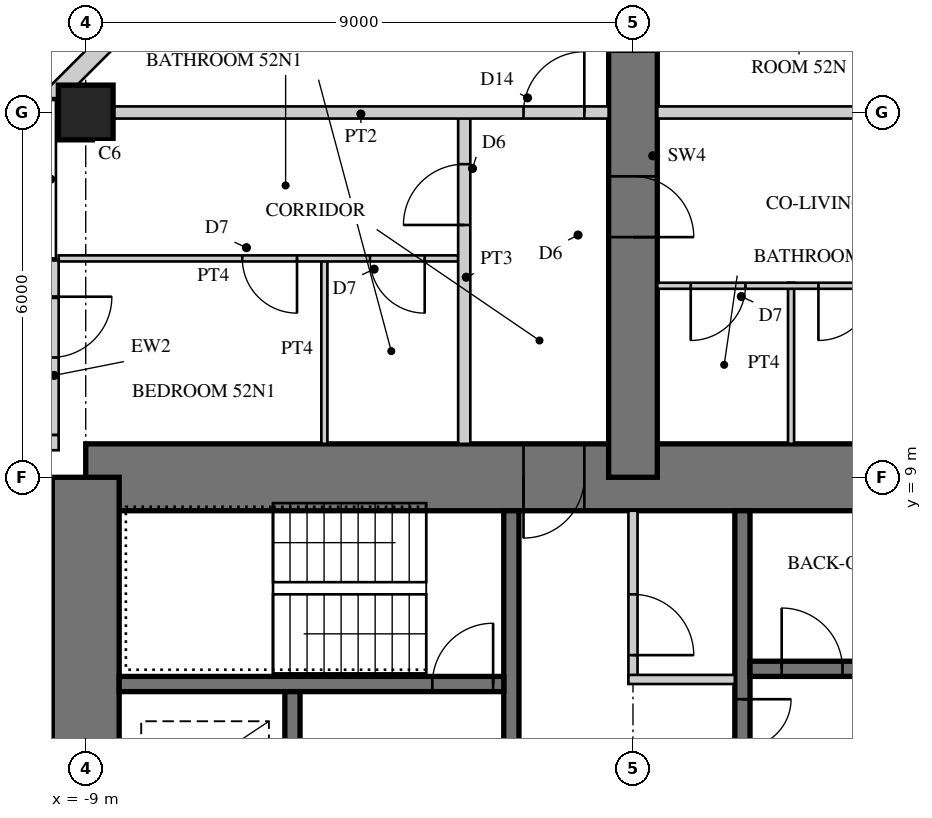
"""IFC4 building model, lengths in metres.
Left out: names, types, materials, properties, quantities, classifications, styles, units other than length and angle.
Written with IfcOpenShell. Run it as: python <this file> out.ifc"""

import sys

from ifc_helpers import new_model, si_unit, direction, frame, frame_2d, origin, origin_2d, place, context, subcontext, project, spatial, rectangle, hollow_rectangle, extrude, element, fill, save


model = new_model("IFC4")
c1 = context("Model", 3, precision=1e-05, world=origin(), true_north=direction((0.0, 1.0)))
c2 = subcontext(c1, "Body", "Model", "MODEL_VIEW")
j1 = project(units=[si_unit("LENGTHUNIT", "METRE"), si_unit("PLANEANGLEUNIT", "RADIAN")], contexts=[c1])
p1 = place(None, origin())
s1 = spatial("IfcSite", under=j1, at=p1, CompositionType="ELEMENT")
p2 = place(p1, origin())
s2 = spatial("IfcBuilding", under=s1, at=p2, CompositionType="ELEMENT")
p3 = place(p2, frame((0.0, 0.0, 206.9)))
s3 = spatial("IfcBuildingStorey", under=s2, at=p3, CompositionType="ELEMENT", Elevation=206.9)
p4 = place(p3, frame((9.0, 9.0, 0.0), z_axis=(0.0, 0.0, 1.0), x_axis=(-1.0, 0.0, 0.0)))
e1 = element("IfcWall", 1, at=p4, inside=s3, PredefinedType="SHEAR", context=c2, shape_type="SweptSolid", body=[
    extrude(rectangle(XDim=18.0, YDim=1.1, at=frame_2d((9.0, 0.0))), origin(), (0.0, 0.0, 1.0), 3.4),
])
p5 = place(p4, frame((9.8, 0.0, 0.0)))
e2 = element("IfcOpeningElement", 2, at=p5, cuts=e1, PredefinedType="OPENING", context=c2, shape_type="SweptSolid", body=[
    extrude(rectangle(XDim=1.0, YDim=2.4, at=frame_2d((0.5, 1.2))), frame((0.0, 0.56, 0.0), z_axis=(0.0, -1.0, 0.0), x_axis=(1.0, 0.0, 0.0)), (0.0, 0.0, 1.0), 1.12),
])
p6 = place(p3, frame((-9.0, 9.0, 0.0), z_axis=(0.0, 0.0, 1.0), x_axis=(0.0, -1.0, 0.0)))
e3 = element("IfcWall", 3, at=p6, inside=s3, PredefinedType="SHEAR", context=c2, shape_type="SweptSolid", body=[
    extrude(rectangle(XDim=18.0, YDim=1.1, at=frame_2d((9.0, 0.0))), origin(), (0.0, 0.0, 1.0), 3.4),
])
p7 = place(p6, frame((9.8, 0.0, 0.0)))
e4 = element("IfcOpeningElement", 4, at=p7, cuts=e3, PredefinedType="OPENING", context=c2, shape_type="SweptSolid", body=[
    extrude(rectangle(XDim=1.0, YDim=2.4, at=frame_2d((0.5, 1.2))), frame((0.0, 0.56, 0.0), z_axis=(0.0, -1.0, 0.0), x_axis=(1.0, 0.0, 0.0)), (0.0, 0.0, 1.0), 1.12),
])
p8 = place(p3, frame((1.8, 1.875, 0.0), z_axis=(0.0, 0.0, 1.0), x_axis=(0.0, 1.0, 0.0)))
e5 = element("IfcWall", 5, at=p8, inside=s3, PredefinedType="SHEAR", context=c2, shape_type="SweptSolid", body=[
    extrude(rectangle(XDim=6.575, YDim=0.25, at=frame_2d((3.288, 0.0))), origin(), (0.0, 0.0, 1.0), 3.4),
])
p9 = place(p8, frame((1.875, 0.0, 0.0)))
e6 = element("IfcOpeningElement", 6, at=p9, cuts=e5, PredefinedType="OPENING", context=c2, shape_type="SweptSolid", body=[
    extrude(rectangle(XDim=1.6, YDim=2.4, at=frame_2d((0.8, 1.2))), frame((0.0, 0.135, 0.0), z_axis=(0.0, -1.0, 0.0), x_axis=(1.0, 0.0, 0.0)), (0.0, 0.0, 1.0), 0.27),
])
p10 = place(p3, frame((1.925, 5.85, 0.0), z_axis=(0.0, 0.0, 1.0), x_axis=(1.0, 0.0, 0.0)))
e7 = element("IfcWall", 7, at=p10, inside=s3, PredefinedType="SHEAR", context=c2, shape_type="SweptSolid", body=[
    extrude(rectangle(XDim=6.525, YDim=0.25, at=frame_2d((3.262, 0.0))), origin(), (0.0, 0.0, 1.0), 3.4),
])
p11 = place(p10, frame((0.521, 0.0, 0.0)))
e8 = element("IfcOpeningElement", 8, at=p11, cuts=e7, PredefinedType="OPENING", context=c2, shape_type="SweptSolid", body=[
    extrude(rectangle(XDim=1.0, YDim=2.1, at=frame_2d((0.5, 1.05))), frame((0.0, 0.135, 0.0), z_axis=(0.0, -1.0, 0.0), x_axis=(1.0, 0.0, 0.0)), (0.0, 0.0, 1.0), 0.27),
])
p12 = place(p3, frame((-2.0, 1.675, 0.0), z_axis=(0.0, 0.0, 1.0), x_axis=(0.0, 1.0, 0.0)))
e9 = element("IfcWall", 9, at=p12, inside=s3, PredefinedType="SHEAR", context=c2, shape_type="SweptSolid", body=[
    extrude(rectangle(XDim=6.775, YDim=0.25, at=frame_2d((3.387, 0.0))), origin(), (0.0, 0.0, 1.0), 3.4),
])
p13 = place(p12, frame((0.725, 0.0, 0.0)))
e10 = element("IfcOpeningElement", 10, at=p13, cuts=e9, PredefinedType="OPENING", context=c2, shape_type="SweptSolid", body=[
    extrude(rectangle(XDim=1.0, YDim=2.1, at=frame_2d((0.5, 1.05))), frame((0.0, 0.135, 0.0), z_axis=(0.0, -1.0, 0.0), x_axis=(1.0, 0.0, 0.0)), (0.0, 0.0, 1.0), 0.27),
])
p14 = place(p3, frame((-2.125, 5.6, 0.0), z_axis=(0.0, 0.0, 1.0), x_axis=(-1.0, 0.0, 0.0)))
e11 = element("IfcWall", 11, at=p14, inside=s3, PredefinedType="SHEAR", context=c2, shape_type="SweptSolid", body=[
    extrude(rectangle(XDim=6.325, YDim=0.25, at=frame_2d((3.163, 0.0))), origin(), (0.0, 0.0, 1.0), 3.4),
])
p15 = place(p14, frame((0.175, 0.0, 0.0)))
e12 = element("IfcOpeningElement", 12, at=p15, cuts=e11, PredefinedType="OPENING", context=c2, shape_type="SweptSolid", body=[
    extrude(rectangle(XDim=1.0, YDim=2.1, at=frame_2d((0.5, 1.05))), frame((0.0, 0.135, 0.0), z_axis=(0.0, -1.0, 0.0), x_axis=(1.0, 0.0, 0.0)), (0.0, 0.0, 1.0), 0.27),
])
p16 = place(p3, frame((-5.6, 1.925, 0.0), z_axis=(0.0, 0.0, 1.0), x_axis=(0.0, 1.0, 0.0)))
e13 = element("IfcWall", 13, at=p16, inside=s3, PredefinedType="SHEAR", context=c2, shape_type="SweptSolid", body=[
    extrude(rectangle(XDim=3.55, YDim=0.25, at=frame_2d((1.775, 0.0))), origin(), (0.0, 0.0, 1.0), 3.4),
])
p17 = place(p16, frame((1.525, 0.0, 0.0)))
e14 = element("IfcOpeningElement", 14, at=p17, cuts=e13, PredefinedType="OPENING", context=c2, shape_type="SweptSolid", body=[
    extrude(rectangle(XDim=1.1, YDim=2.2, at=frame_2d((0.55, 1.1))), frame((0.0, 0.135, 0.0), z_axis=(0.0, -1.0, 0.0), x_axis=(1.0, 0.0, 0.0)), (0.0, 0.0, 1.0), 0.27),
])
p18 = place(p16, frame((0.075, 0.0, 0.0)))
e15 = element("IfcOpeningElement", 15, at=p18, cuts=e13, PredefinedType="OPENING", context=c2, shape_type="SweptSolid", body=[
    extrude(rectangle(XDim=0.8, YDim=2.1, at=frame_2d((0.4, 1.05))), frame((0.0, 0.135, 0.0), z_axis=(0.0, -1.0, 0.0), x_axis=(1.0, 0.0, 0.0)), (0.0, 0.0, 1.0), 0.27),
])
p19 = place(p3, frame((0.0, 9.0, 0.0), z_axis=(0.0, 0.0, 1.0), x_axis=(0.0, 1.0, 0.0)))
e16 = element("IfcWall", 16, at=p19, inside=s3, PredefinedType="SHEAR", context=c2, shape_type="SweptSolid", body=[
    extrude(rectangle(XDim=9.0, YDim=0.8, at=frame_2d((4.5, 0.0))), origin(), (0.0, 0.0, 1.0), 3.4),
])
p20 = place(p19, frame((3.95, 0.0, 0.0)))
e17 = element("IfcOpeningElement", 17, at=p20, cuts=e16, PredefinedType="OPENING", context=c2, shape_type="SweptSolid", body=[
    extrude(rectangle(XDim=1.0, YDim=2.15, at=frame_2d((0.5, 1.075))), frame((0.0, 0.41, 0.0), z_axis=(0.0, -1.0, 0.0), x_axis=(1.0, 0.0, 0.0)), (0.0, 0.0, 1.0), 0.82),
])
p21 = place(p19, frame((7.0, 0.0, 0.0)))
e18 = element("IfcOpeningElement", 18, at=p21, cuts=e16, PredefinedType="OPENING", context=c2, shape_type="SweptSolid", body=[
    extrude(rectangle(XDim=1.0, YDim=2.2, at=frame_2d((0.5, 1.1))), frame((0.0, 0.41, 0.0), z_axis=(0.0, -1.0, 0.0), x_axis=(1.0, 0.0, 0.0)), (0.0, 0.0, 1.0), 0.82),
])
p22 = place(p3, frame((-9.0, 15.0, 0.0), z_axis=(0.0, 0.0, 1.0), x_axis=(1.0, 0.0, 0.0)))
e19 = element("IfcColumn", 19, at=p22, inside=s3, PredefinedType="COLUMN", context=c2, shape_type="SweptSolid", body=[
    extrude(rectangle(XDim=0.9, YDim=0.9, at=origin_2d()), origin(), (0.0, 0.0, 1.0), 3.4),
])
p23 = place(p3, frame((-6.406, 18.4, 0.0), z_axis=(0.0, 0.0, 1.0), x_axis=(-0.707134062067, -0.707079499254, 0.0)))
e20 = element("IfcWall", 20, at=p23, inside=s3, PredefinedType="SOLIDWALL", context=c2, shape_type="SweptSolid", body=[
    extrude(rectangle(XDim=4.475, YDim=0.3, at=frame_2d((2.237, 0.0))), origin(), (0.0, 0.0, 1.0), 3.22),
])
p24 = place(p23, frame((1.787, 0.0, 0.3)))
e21 = element("IfcOpeningElement", 21, at=p24, cuts=e20, PredefinedType="OPENING", context=c2, shape_type="SweptSolid", body=[
    extrude(rectangle(XDim=0.9, YDim=2.4, at=frame_2d((0.45, 1.2))), frame((0.0, 0.16, 0.0), z_axis=(0.0, -1.0, 0.0), x_axis=(1.0, 0.0, 0.0)), (0.0, 0.0, 1.0), 0.32),
])
p25 = place(p3, frame((-9.57, 12.57, 0.0), z_axis=(0.0, 0.0, 1.0), x_axis=(0.0, -1.0, 0.0)))
e22 = element("IfcWall", 22, at=p25, inside=s3, PredefinedType="SOLIDWALL", context=c2, shape_type="SweptSolid", body=[
    extrude(rectangle(XDim=2.875, YDim=0.25, at=frame_2d((1.438, 0.0))), origin(), (0.0, 0.0, 1.0), 3.22),
])
p26 = place(p25, frame((0.6, 0.0, 0.0)))
e23 = element("IfcOpeningElement", 23, at=p26, cuts=e22, PredefinedType="OPENING", context=c2, shape_type="SweptSolid", body=[
    extrude(rectangle(XDim=1.0, YDim=2.2, at=frame_2d((0.5, 1.1))), frame((0.0, 0.135, 0.0), z_axis=(0.0, -1.0, 0.0), x_axis=(1.0, 0.0, 0.0)), (0.0, 0.0, 1.0), 0.27),
])
p27 = place(p3, frame((-9.445, 9.57, 0.0), z_axis=(0.0, 0.0, 1.0), x_axis=(-1.0, 0.0, 0.0)))
e24 = element("IfcWall", 24, at=p27, inside=s3, PredefinedType="SOLIDWALL", context=c2, shape_type="SweptSolid", body=[
    extrude(rectangle(XDim=3.125, YDim=0.25, at=frame_2d((1.562, 0.0))), origin(), (0.0, 0.0, 1.0), 3.22),
])
p28 = place(p27, frame((0.6, 0.0, 0.0)))
e25 = element("IfcOpeningElement", 25, at=p28, cuts=e24, PredefinedType="OPENING", context=c2, shape_type="SweptSolid", body=[
    extrude(rectangle(XDim=1.0, YDim=2.2, at=frame_2d((0.5, 1.1))), frame((0.0, 0.135, 0.0), z_axis=(0.0, -1.0, 0.0), x_axis=(1.0, 0.0, 0.0)), (0.0, 0.0, 1.0), 0.27),
])
p29 = place(p3, frame((0.0, 5.675, 0.0), z_axis=(0.0, 0.0, 1.0), x_axis=(0.0, 1.0, 0.0)))
e26 = element("IfcWall", 26, at=p29, inside=s3, PredefinedType="PARTITIONING", context=c2, shape_type="SweptSolid", body=[
    extrude(rectangle(XDim=2.775, YDim=0.15, at=frame_2d((1.387, 0.0))), origin(), (0.0, 0.0, 1.0), 3.22),
])
p30 = place(p29, frame((0.4, 0.0, 0.0)))
e27 = element("IfcOpeningElement", 27, at=p30, cuts=e26, PredefinedType="OPENING", context=c2, shape_type="SweptSolid", body=[
    extrude(rectangle(XDim=1.0, YDim=2.1, at=frame_2d((0.5, 1.05))), frame((0.0, 0.085, 0.0), z_axis=(0.0, -1.0, 0.0), x_axis=(1.0, 0.0, 0.0)), (0.0, 0.0, 1.0), 0.17),
])
p31 = place(p3, frame((1.675, 5.675, 0.0), z_axis=(0.0, 0.0, 1.0), x_axis=(-1.0, 0.0, 0.0)))
e28 = element("IfcWall", 28, at=p31, inside=s3, PredefinedType="PARTITIONING", context=c2, shape_type="SweptSolid", body=[
    extrude(rectangle(XDim=1.75, YDim=0.15, at=frame_2d((0.875, 0.0))), origin(), (0.0, 0.0, 1.0), 3.22),
])
p32 = place(p3, frame((-5.075, 9.55, 0.0), z_axis=(0.0, 0.0, 1.0), x_axis=(0.0, 1.0, 0.0)))
e29 = element("IfcWall", 29, at=p32, inside=s3, PredefinedType="PARTITIONING", context=c2, shape_type="SweptSolid", body=[
    extrude(rectangle(XDim=3.1, YDim=0.1, at=frame_2d((1.55, 0.0))), origin(), (0.0, 0.0, 1.0), 3.22),
])
p33 = place(p3, frame((-2.875, 12.6, 0.0), z_axis=(0.0, 0.0, 1.0), x_axis=(-1.0, 0.0, 0.0)))
e30 = element("IfcWall", 30, at=p33, inside=s3, PredefinedType="PARTITIONING", context=c2, shape_type="SweptSolid", body=[
    extrude(rectangle(XDim=6.57, YDim=0.1, at=frame_2d((3.285, 0.0))), origin(), (0.0, 0.0, 1.0), 3.22),
])
p34 = place(p33, frame((0.55, 0.0, 0.0)))
e31 = element("IfcOpeningElement", 31, at=p34, cuts=e30, PredefinedType="OPENING", context=c2, shape_type="SweptSolid", body=[
    extrude(rectangle(XDim=0.9, YDim=2.1, at=frame_2d((0.45, 1.05))), frame((0.0, 0.06, 0.0), z_axis=(0.0, -1.0, 0.0), x_axis=(1.0, 0.0, 0.0)), (0.0, 0.0, 1.0), 0.12),
])
p35 = place(p33, frame((2.65, 0.0, 0.0)))
e32 = element("IfcOpeningElement", 32, at=p35, cuts=e30, PredefinedType="OPENING", context=c2, shape_type="SweptSolid", body=[
    extrude(rectangle(XDim=0.9, YDim=2.1, at=frame_2d((0.45, 1.05))), frame((0.0, 0.06, 0.0), z_axis=(0.0, -1.0, 0.0), x_axis=(1.0, 0.0, 0.0)), (0.0, 0.0, 1.0), 0.12),
])
p36 = place(p3, frame((2.6, 9.55, 0.0), z_axis=(0.0, 0.0, 1.0), x_axis=(0.0, 1.0, 0.0)))
e33 = element("IfcWall", 33, at=p36, inside=s3, PredefinedType="PARTITIONING", context=c2, shape_type="SweptSolid", body=[
    extrude(rectangle(XDim=2.65, YDim=0.1, at=frame_2d((1.325, 0.0))), origin(), (0.0, 0.0, 1.0), 3.22),
])
p37 = place(p3, frame((9.445, 12.15, 0.0), z_axis=(0.0, 0.0, 1.0), x_axis=(-1.0, 0.0, 0.0)))
e34 = element("IfcWall", 34, at=p37, inside=s3, PredefinedType="PARTITIONING", context=c2, shape_type="SweptSolid", body=[
    extrude(rectangle(XDim=9.045, YDim=0.1, at=frame_2d((4.522, 0.0))), origin(), (0.0, 0.0, 1.0), 3.22),
])
p38 = place(p37, frame((5.495, 0.0, 0.0)))
e35 = element("IfcOpeningElement", 35, at=p38, cuts=e34, PredefinedType="OPENING", context=c2, shape_type="SweptSolid", body=[
    extrude(rectangle(XDim=0.9, YDim=2.1, at=frame_2d((0.45, 1.05))), frame((0.0, 0.06, 0.0), z_axis=(0.0, -1.0, 0.0), x_axis=(1.0, 0.0, 0.0)), (0.0, 0.0, 1.0), 0.12),
])
p39 = place(p37, frame((7.595, 0.0, 0.0)))
e36 = element("IfcOpeningElement", 36, at=p39, cuts=e34, PredefinedType="OPENING", context=c2, shape_type="SweptSolid", body=[
    extrude(rectangle(XDim=0.9, YDim=2.1, at=frame_2d((0.45, 1.05))), frame((0.0, 0.06, 0.0), z_axis=(0.0, -1.0, 0.0), x_axis=(1.0, 0.0, 0.0)), (0.0, 0.0, 1.0), 0.12),
])
p40 = place(p3, frame((-2.775, 9.55, 0.0), z_axis=(0.0, 0.0, 1.0), x_axis=(0.0, 1.0, 0.0)))
e37 = element("IfcWall", 37, at=p40, inside=s3, PredefinedType="SOLIDWALL", context=c2, shape_type="SweptSolid", body=[
    extrude(rectangle(XDim=5.45, YDim=0.2, at=frame_2d((2.725, 0.0))), origin(), (0.0, 0.0, 1.0), 3.22),
])
p41 = place(p40, frame((3.6, 0.0, 0.0)))
e38 = element("IfcOpeningElement", 38, at=p41, cuts=e37, PredefinedType="OPENING", context=c2, shape_type="SweptSolid", body=[
    extrude(rectangle(XDim=1.0, YDim=2.15, at=frame_2d((0.5, 1.075))), frame((0.0, 0.11, 0.0), z_axis=(0.0, -1.0, 0.0), x_axis=(1.0, 0.0, 0.0)), (0.0, 0.0, 1.0), 0.22),
])
p42 = place(p3, frame((8.55, 15.0, 0.0), z_axis=(0.0, 0.0, 1.0), x_axis=(-1.0, 0.0, 0.0)))
e39 = element("IfcWall", 39, at=p42, inside=s3, PredefinedType="SOLIDWALL", context=c2, shape_type="SweptSolid", body=[
    extrude(rectangle(XDim=8.15, YDim=0.2, at=frame_2d((4.075, 0.0))), origin(), (0.0, 0.0, 1.0), 2.47),
])
p43 = place(p3, frame((-0.4, 15.0, 0.0), z_axis=(0.0, 0.0, 1.0), x_axis=(-1.0, 0.0, 0.0)))
e40 = element("IfcWall", 40, at=p43, inside=s3, PredefinedType="SOLIDWALL", context=c2, shape_type="SweptSolid", body=[
    extrude(rectangle(XDim=8.15, YDim=0.2, at=frame_2d((4.075, 0.0))), origin(), (0.0, 0.0, 1.0), 2.47),
])
p44 = place(p43, frame((0.4, 0.0, 0.0)))
e41 = element("IfcOpeningElement", 41, at=p44, cuts=e40, PredefinedType="OPENING", context=c2, shape_type="SweptSolid", body=[
    extrude(rectangle(XDim=1.0, YDim=2.2, at=frame_2d((0.5, 1.1))), frame((0.0, 0.11, 0.0), z_axis=(0.0, -1.0, 0.0), x_axis=(1.0, 0.0, 0.0)), (0.0, 0.0, 1.0), 0.22),
])
p45 = place(p26, origin())
e42 = element("IfcDoor", 42, at=p45, inside=s3, OperationType="SINGLE_SWING_LEFT", PredefinedType="DOOR", context=c2, shape_type="SweptSolid", body=[
    extrude(hollow_rectangle(XDim=1.0, YDim=2.2, WallThickness=0.06, at=frame_2d((0.5, 1.1))), frame((0.0, 0.025, 0.0), z_axis=(0.0, -1.0, 0.0), x_axis=(1.0, 0.0, 0.0)), (0.0, 0.0, 1.0), 0.05),
    extrude(rectangle(XDim=0.879, YDim=2.079, at=frame_2d((0.5, 1.1))), frame((0.0, 0.025, 0.0), z_axis=(0.0, -1.0, 0.0), x_axis=(1.0, 0.0, 0.0)), (0.0, 0.0, 1.0), 0.05),
])
fill(e23, e42)
p46 = place(p30, frame((1.0, 0.0, 0.0), z_axis=(0.0, 0.0, 1.0), x_axis=(-1.0, 0.0, 0.0)))
e43 = element("IfcDoor", 43, at=p46, inside=s3, OperationType="SINGLE_SWING_RIGHT", PredefinedType="DOOR", context=c2, shape_type="SweptSolid", body=[
    extrude(rectangle(XDim=1.0, YDim=2.1, at=frame_2d((0.5, 1.05))), frame((0.0, 0.025, 0.0), z_axis=(0.0, -1.0, 0.0), x_axis=(1.0, 0.0, 0.0)), (0.0, 0.0, 1.0), 0.05),
])
fill(e27, e43)
p47 = place(p34, origin())
e44 = element("IfcDoor", 44, at=p47, inside=s3, OperationType="SINGLE_SWING_LEFT", PredefinedType="DOOR", context=c2, shape_type="SweptSolid", body=[
    extrude(rectangle(XDim=0.9, YDim=2.1, at=frame_2d((0.45, 1.05))), frame((0.0, 0.025, 0.0), z_axis=(0.0, -1.0, 0.0), x_axis=(1.0, 0.0, 0.0)), (0.0, 0.0, 1.0), 0.05),
])
fill(e31, e44)
p48 = place(p35, origin())
e45 = element("IfcDoor", 45, at=p48, inside=s3, OperationType="SINGLE_SWING_LEFT", PredefinedType="DOOR", context=c2, shape_type="SweptSolid", body=[
    extrude(rectangle(XDim=0.9, YDim=2.1, at=frame_2d((0.45, 1.05))), frame((0.0, 0.025, 0.0), z_axis=(0.0, -1.0, 0.0), x_axis=(1.0, 0.0, 0.0)), (0.0, 0.0, 1.0), 0.05),
])
fill(e32, e45)
p49 = place(p38, origin())
e46 = element("IfcDoor", 46, at=p49, inside=s3, OperationType="SINGLE_SWING_RIGHT", PredefinedType="DOOR", context=c2, shape_type="SweptSolid", body=[
    extrude(rectangle(XDim=0.9, YDim=2.1, at=frame_2d((0.45, 1.05))), frame((0.0, 0.025, 0.0), z_axis=(0.0, -1.0, 0.0), x_axis=(1.0, 0.0, 0.0)), (0.0, 0.0, 1.0), 0.05),
])
fill(e35, e46)
p50 = place(p39, origin())
e47 = element("IfcDoor", 47, at=p50, inside=s3, OperationType="SINGLE_SWING_RIGHT", PredefinedType="DOOR", context=c2, shape_type="SweptSolid", body=[
    extrude(rectangle(XDim=0.9, YDim=2.1, at=frame_2d((0.45, 1.05))), frame((0.0, 0.025, 0.0), z_axis=(0.0, -1.0, 0.0), x_axis=(1.0, 0.0, 0.0)), (0.0, 0.0, 1.0), 0.05),
])
fill(e36, e47)
p51 = place(p41, origin())
e48 = element("IfcDoor", 48, at=p51, inside=s3, OperationType="SINGLE_SWING_LEFT", PredefinedType="DOOR", context=c2, shape_type="SweptSolid", body=[
    extrude(rectangle(XDim=1.0, YDim=2.15, at=frame_2d((0.5, 1.075))), frame((0.0, 0.025, 0.0), z_axis=(0.0, -1.0, 0.0), x_axis=(1.0, 0.0, 0.0)), (0.0, 0.0, 1.0), 0.05),
])
fill(e38, e48)
p52 = place(p44, frame((1.0, 0.0, 0.0), z_axis=(0.0, 0.0, 1.0), x_axis=(-1.0, 0.0, 0.0)))
e49 = element("IfcDoor", 49, at=p52, inside=s3, OperationType="SINGLE_SWING_RIGHT", PredefinedType="DOOR", context=c2, shape_type="SweptSolid", body=[
    extrude(rectangle(XDim=1.0, YDim=2.2, at=frame_2d((0.5, 1.1))), frame((0.0, 0.025, 0.0), z_axis=(0.0, -1.0, 0.0), x_axis=(1.0, 0.0, 0.0)), (0.0, 0.0, 1.0), 0.05),
])
fill(e41, e49)
p53 = place(p20, frame((1.0, 0.0, 0.0), z_axis=(0.0, 0.0, 1.0), x_axis=(-1.0, 0.0, 0.0)))
e50 = element("IfcDoor", 50, at=p53, inside=s3, OperationType="SINGLE_SWING_RIGHT", PredefinedType="DOOR", context=c2, shape_type="SweptSolid", body=[
    extrude(rectangle(XDim=1.0, YDim=2.15, at=frame_2d((0.5, 1.075))), frame((0.0, 0.025, 0.0), z_axis=(0.0, -1.0, 0.0), x_axis=(1.0, 0.0, 0.0)), (0.0, 0.0, 1.0), 0.05),
])
fill(e17, e50)
p54 = place(p5, origin())
e51 = element("IfcDoor", 51, at=p54, inside=s3, OperationType="SINGLE_SWING_RIGHT", PredefinedType="DOOR", context=c2, shape_type="SweptSolid", body=[
    extrude(rectangle(XDim=1.0, YDim=2.4, at=frame_2d((0.5, 1.2))), frame((0.0, 0.055, 0.0), z_axis=(0.0, -1.0, 0.0), x_axis=(1.0, 0.0, 0.0)), (0.0, 0.0, 1.0), 0.05),
])
fill(e2, e51)
p55 = place(p9, frame((1.6, 0.0, 0.0), z_axis=(0.0, 0.0, 1.0), x_axis=(-1.0, 0.0, 0.0)))
e52 = element("IfcDoor", 52, at=p55, inside=s3, OperationType="DOUBLE_DOOR_SINGLE_SWING", PredefinedType="DOOR", context=c2, shape_type="SweptSolid", body=[
    extrude(rectangle(XDim=1.6, YDim=2.4, at=frame_2d((0.8, 1.2))), frame((0.0, 0.025, 0.0), z_axis=(0.0, -1.0, 0.0), x_axis=(1.0, 0.0, 0.0)), (0.0, 0.0, 1.0), 0.05),
])
fill(e6, e52)
p56 = place(p15, frame((1.0, 0.0, 0.0), z_axis=(0.0, 0.0, 1.0), x_axis=(-1.0, 0.0, 0.0)))
e53 = element("IfcDoor", 53, at=p56, inside=s3, OperationType="SINGLE_SWING_RIGHT", PredefinedType="DOOR", context=c2, shape_type="SweptSolid", body=[
    extrude(rectangle(XDim=1.0, YDim=2.1, at=frame_2d((0.5, 1.05))), frame((0.0, 0.025, 0.0), z_axis=(0.0, -1.0, 0.0), x_axis=(1.0, 0.0, 0.0)), (0.0, 0.0, 1.0), 0.05),
])
fill(e12, e53)
p57 = place(p11, origin())
e54 = element("IfcDoor", 54, at=p57, inside=s3, OperationType="SINGLE_SWING_LEFT", PredefinedType="DOOR", context=c2, shape_type="SweptSolid", body=[
    extrude(rectangle(XDim=1.0, YDim=2.1, at=frame_2d((0.5, 1.05))), frame((0.0, 0.025, 0.0), z_axis=(0.0, -1.0, 0.0), x_axis=(1.0, 0.0, 0.0)), (0.0, 0.0, 1.0), 0.05),
])
fill(e8, e54)
save(model, sys.argv[1])
